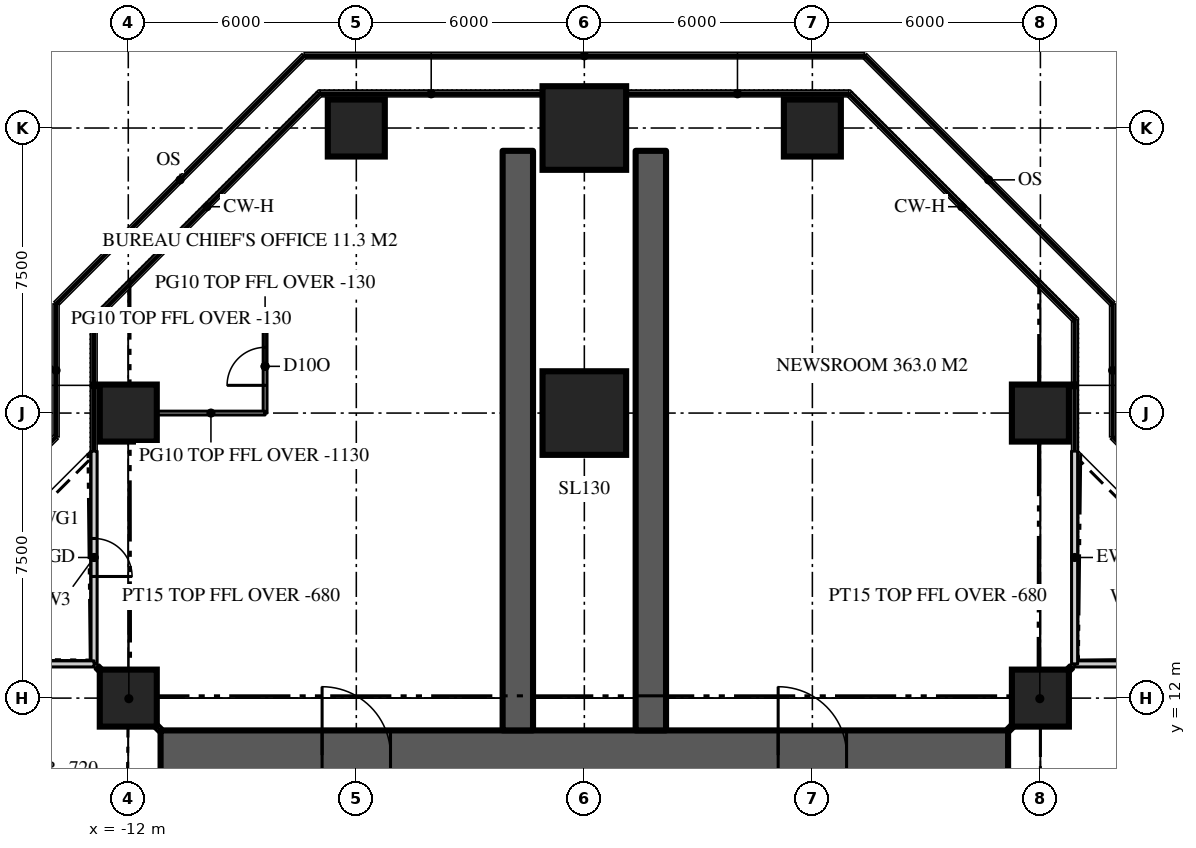
"""IFC4 building model, lengths in metres.
Left out: names, types, materials, properties, quantities, classifications, styles, units other than length and angle.
Written with IfcOpenShell. Run it as: python <this file> out.ifc"""

import sys

from ifc_helpers import new_model, si_unit, direction, frame, frame_2d, origin, origin_2d, place, context, subcontext, project, spatial, rectangle, extrude, element, fill, save


model = new_model("IFC4")
c1 = context("Model", 3, precision=1e-05, world=origin(), true_north=direction((0.0, 1.0)))
c2 = subcontext(c1, "Body", "Model", "MODEL_VIEW")
j1 = project(units=[si_unit("LENGTHUNIT", "METRE"), si_unit("PLANEANGLEUNIT", "RADIAN")], contexts=[c1])
p1 = place(None, origin())
s1 = spatial("IfcSite", under=j1, at=p1, CompositionType="ELEMENT")
p2 = place(p1, origin())
s2 = spatial("IfcBuilding", under=s1, at=p2, CompositionType="ELEMENT")
p3 = place(p2, frame((0.0, 0.0, 240.0)))
s3 = spatial("IfcBuildingStorey", under=s2, at=p3, CompositionType="ELEMENT", Elevation=240.0)
p4 = place(p3, frame((-11.15, 10.5, 0.0), z_axis=(0.0, 0.0, 1.0), x_axis=(1.0, 0.0, 0.0)))
e1 = element("IfcWall", 1, at=p4, inside=s3, PredefinedType="SHEAR", context=c2, shape_type="SweptSolid", body=[
    extrude(rectangle(XDim=22.3, YDim=1.3, at=frame_2d((11.15, 0.0))), origin(), (0.0, 0.0, 1.0), 3.9),
])
p5 = place(p4, frame((4.25, 0.0, 0.0)))
e2 = element("IfcOpeningElement", 2, at=p5, cuts=e1, PredefinedType="OPENING", context=c2, shape_type="SweptSolid", body=[
    extrude(rectangle(XDim=1.8, YDim=2.2, at=frame_2d((0.9, 1.1))), frame((0.0, 0.66, 0.0), z_axis=(0.0, -1.0, 0.0), x_axis=(1.0, 0.0, 0.0)), (0.0, 0.0, 1.0), 1.32),
])
p6 = place(p4, frame((16.25, 0.0, 0.0)))
e3 = element("IfcOpeningElement", 3, at=p6, cuts=e1, PredefinedType="OPENING", context=c2, shape_type="SweptSolid", body=[
    extrude(rectangle(XDim=1.8, YDim=2.2, at=frame_2d((0.9, 1.1))), frame((0.0, 0.66, 0.0), z_axis=(0.0, -1.0, 0.0), x_axis=(1.0, 0.0, 0.0)), (0.0, 0.0, 1.0), 1.32),
])
for number, where, z_axis, x_axis in (
    (4, (1.75, 11.15, 0.0), (0.0, 0.0, 1.0), (0.0, 1.0, 0.0)),
    (5, (-1.75, 11.15, 0.0), (0.0, 0.0, 1.0), (0.0, 1.0, 0.0)),
):
    element("IfcWall", number, at=place(p3, frame(where, z_axis=z_axis, x_axis=x_axis)), inside=s3, PredefinedType="SHEAR", context=c2, shape_type="SweptSolid", body=[
        extrude(rectangle(XDim=15.25, YDim=0.8, at=frame_2d((7.625, 0.0))), origin(), (0.0, 0.0, 1.0), 3.9),
    ])
for number, where, z_axis, x_axis in (
    (6, (-12.0, 12.0, 0.0), (0.0, 0.0, 1.0), (1.0, 0.0, 0.0)),
    (7, (12.0, 12.0, 0.0), (0.0, 0.0, 1.0), (1.0, 0.0, 0.0)),
    (8, (-12.0, 19.5, 0.0), (0.0, 0.0, 1.0), (1.0, 0.0, 0.0)),
):
    element("IfcColumn", number, at=place(p3, frame(where, z_axis=z_axis, x_axis=x_axis)), inside=s3, PredefinedType="COLUMN", context=c2, shape_type="SweptSolid", body=[
        extrude(rectangle(XDim=1.5, YDim=1.5, at=origin_2d()), origin(), (0.0, 0.0, 1.0), 3.9),
    ])
p7 = place(p3, frame((0.0, 19.5, 0.0), z_axis=(0.0, 0.0, 1.0), x_axis=(1.0, 0.0, 0.0)))
e9 = element("IfcColumn", 9, at=p7, inside=s3, PredefinedType="COLUMN", context=c2, shape_type="SweptSolid", body=[
    extrude(rectangle(XDim=2.2, YDim=2.2, at=origin_2d()), origin(), (0.0, 0.0, 1.0), 3.9),
])
for number, where, z_axis, x_axis in (
    (10, (12.0, 19.5, 0.0), (0.0, 0.0, 1.0), (1.0, 0.0, 0.0)),
    (11, (-6.0, 27.0, 0.0), (0.0, 0.0, 1.0), (1.0, 0.0, 0.0)),
):
    element("IfcColumn", number, at=place(p3, frame(where, z_axis=z_axis, x_axis=x_axis)), inside=s3, PredefinedType="COLUMN", context=c2, shape_type="SweptSolid", body=[
        extrude(rectangle(XDim=1.5, YDim=1.5, at=origin_2d()), origin(), (0.0, 0.0, 1.0), 3.9),
    ])
p8 = place(p3, frame((0.0, 27.0, 0.0), z_axis=(0.0, 0.0, 1.0), x_axis=(1.0, 0.0, 0.0)))
e12 = element("IfcColumn", 12, at=p8, inside=s3, PredefinedType="COLUMN", context=c2, shape_type="SweptSolid", body=[
    extrude(rectangle(XDim=2.2, YDim=2.2, at=origin_2d()), origin(), (0.0, 0.0, 1.0), 3.9),
])
p9 = place(p3, frame((6.0, 27.0, 0.0), z_axis=(0.0, 0.0, 1.0), x_axis=(1.0, 0.0, 0.0)))
e13 = element("IfcColumn", 13, at=p9, inside=s3, PredefinedType="COLUMN", context=c2, shape_type="SweptSolid", body=[
    extrude(rectangle(XDim=1.5, YDim=1.5, at=origin_2d()), origin(), (0.0, 0.0, 1.0), 3.9),
])
p10 = place(p3, frame((18.5, 12.9, 0.0), z_axis=(0.0, 0.0, 1.0), x_axis=(-1.0, 0.0, 0.0)))
e14 = element("IfcWall", 14, at=p10, inside=s3, PredefinedType="SOLIDWALL", context=c2, shape_type="SweptSolid", body=[
    extrude(rectangle(XDim=5.6, YDim=0.16, at=frame_2d((2.8, 0.0))), origin(), (0.0, 0.0, 1.0), 3.77),
])
p11 = place(p10, frame((2.3, 0.0, 0.0)))
e15 = element("IfcOpeningElement", 15, at=p11, cuts=e14, PredefinedType="OPENING", context=c2, shape_type="SweptSolid", body=[
    extrude(rectangle(XDim=1.0, YDim=2.2, at=frame_2d((0.5, 1.1))), frame((0.0, 0.09, 0.0), z_axis=(0.0, -1.0, 0.0), x_axis=(1.0, 0.0, 0.0)), (0.0, 0.0, 1.0), 0.18),
])
p12 = place(p3, frame((12.9, 12.9, 0.0), z_axis=(0.0, 0.0, 1.0), x_axis=(0.0, 1.0, 0.0)))
e16 = element("IfcWall", 16, at=p12, inside=s3, PredefinedType="SOLIDWALL", context=c2, shape_type="SweptSolid", body=[
    extrude(rectangle(XDim=5.6, YDim=0.16, at=frame_2d((2.8, 0.0))), origin(), (0.0, 0.0, 1.0), 3.77),
])
p13 = place(p3, frame((-12.9, 18.5, 0.0), z_axis=(0.0, 0.0, 1.0), x_axis=(0.0, -1.0, 0.0)))
e17 = element("IfcWall", 17, at=p13, inside=s3, PredefinedType="SOLIDWALL", context=c2, shape_type="SweptSolid", body=[
    extrude(rectangle(XDim=5.6, YDim=0.16, at=frame_2d((2.8, 0.0))), origin(), (0.0, 0.0, 1.0), 3.77),
])
p14 = place(p13, frame((2.3, 0.0, 0.0)))
e18 = element("IfcOpeningElement", 18, at=p14, cuts=e17, PredefinedType="OPENING", context=c2, shape_type="SweptSolid", body=[
    extrude(rectangle(XDim=1.0, YDim=2.2, at=frame_2d((0.5, 1.1))), frame((0.0, 0.09, 0.0), z_axis=(0.0, -1.0, 0.0), x_axis=(1.0, 0.0, 0.0)), (0.0, 0.0, 1.0), 0.18),
])
p15 = place(p3, frame((-12.9, 12.9, 0.0), z_axis=(0.0, 0.0, 1.0), x_axis=(-1.0, 0.0, 0.0)))
e19 = element("IfcWall", 19, at=p15, inside=s3, PredefinedType="SOLIDWALL", context=c2, shape_type="SweptSolid", body=[
    extrude(rectangle(XDim=5.6, YDim=0.16, at=frame_2d((2.8, 0.0))), origin(), (0.0, 0.0, 1.0), 3.77),
])
p16 = place(p3, frame((-8.4, 19.5, 0.0), z_axis=(0.0, 0.0, 1.0), x_axis=(0.0, 1.0, 0.0)))
e20 = element("IfcWall", 20, at=p16, inside=s3, PredefinedType="PARTITIONING", context=c2, shape_type="SweptSolid", body=[
    extrude(rectangle(XDim=2.459, YDim=0.1, at=frame_2d((1.229, 0.0))), origin(), (0.0, 0.0, 1.0), 3.77),
])
p17 = place(p16, frame((0.729, 0.0, 0.0)))
e21 = element("IfcOpeningElement", 21, at=p17, cuts=e20, PredefinedType="OPENING", context=c2, shape_type="SweptSolid", body=[
    extrude(rectangle(XDim=1.0, YDim=2.2, at=frame_2d((0.5, 1.1))), frame((0.0, 0.06, 0.0), z_axis=(0.0, -1.0, 0.0), x_axis=(1.0, 0.0, 0.0)), (0.0, 0.0, 1.0), 0.12),
])
p18 = place(p3, frame((-8.4, 19.5, 0.0), z_axis=(0.0, 0.0, 1.0), x_axis=(-1.0, 0.0, 0.0)))
e22 = element("IfcWall", 22, at=p18, inside=s3, PredefinedType="PARTITIONING", context=c2, shape_type="SweptSolid", body=[
    extrude(rectangle(XDim=2.85, YDim=0.1, at=frame_2d((1.425, 0.0))), origin(), (0.0, 0.0, 1.0), 2.77),
])
p19 = place(p3, frame((-8.4, 21.959, 0.0), z_axis=(0.0, 0.0, 1.0), x_axis=(-1.0, 0.0, 0.0)))
e23 = element("IfcWall", 23, at=p19, inside=s3, PredefinedType="PARTITIONING", context=c2, shape_type="SweptSolid", body=[
    extrude(rectangle(XDim=4.42, YDim=0.1, at=frame_2d((2.21, 0.0))), origin(), (0.0, 0.0, 1.0), 3.77),
])
for number, where, z_axis, x_axis in (
    (24, (11.15, 11.15, 0.0), (0.0, 0.0, 1.0), (0.707, 0.707, 0.0)),
    (25, (-11.15, 11.15, 0.0), (0.0, 0.0, 1.0), (-0.707, 0.707, 0.0)),
):
    element("IfcWall", number, at=place(p3, frame(where, z_axis=z_axis, x_axis=x_axis)), inside=s3, PredefinedType="PARTITIONING", context=c2, shape_type="SweptSolid", body=[
        extrude(rectangle(XDim=2.362, YDim=0.15, at=frame_2d((1.181, 0.0))), origin(), (0.0, 0.0, 1.0), 3.22),
    ])
p20 = place(p14, origin())
e26 = element("IfcDoor", 26, at=p20, inside=s3, OperationType="SINGLE_SWING_RIGHT", PredefinedType="DOOR", context=c2, shape_type="SweptSolid", body=[
    extrude(rectangle(XDim=1.0, YDim=2.2, at=frame_2d((0.5, 1.1))), frame((0.0, 0.025, 0.0), z_axis=(0.0, -1.0, 0.0), x_axis=(1.0, 0.0, 0.0)), (0.0, 0.0, 1.0), 0.05),
])
fill(e18, e26)
p21 = place(p5, origin())
e27 = element("IfcDoor", 27, at=p21, inside=s3, OperationType="DOUBLE_DOOR_DOUBLE_SWING", PredefinedType="DOOR", context=c2, shape_type="SweptSolid", body=[
    extrude(rectangle(XDim=1.8, YDim=2.2, at=frame_2d((0.9, 1.1))), frame((0.0, 0.025, 0.0), z_axis=(0.0, -1.0, 0.0), x_axis=(1.0, 0.0, 0.0)), (0.0, 0.0, 1.0), 0.05),
])
fill(e2, e27)
p22 = place(p6, origin())
e28 = element("IfcDoor", 28, at=p22, inside=s3, OperationType="DOUBLE_DOOR_DOUBLE_SWING", PredefinedType="DOOR", context=c2, shape_type="SweptSolid", body=[
    extrude(rectangle(XDim=1.8, YDim=2.2, at=frame_2d((0.9, 1.1))), frame((0.0, 0.025, 0.0), z_axis=(0.0, -1.0, 0.0), x_axis=(1.0, 0.0, 0.0)), (0.0, 0.0, 1.0), 0.05),
])
fill(e3, e28)
p23 = place(p17, origin())
e29 = element("IfcDoor", 29, at=p23, inside=s3, OperationType="SINGLE_SWING_LEFT", PredefinedType="DOOR", context=c2, shape_type="SweptSolid", body=[
    extrude(rectangle(XDim=1.0, YDim=2.2, at=frame_2d((0.5, 1.1))), frame((0.0, 0.025, 0.0), z_axis=(0.0, -1.0, 0.0), x_axis=(1.0, 0.0, 0.0)), (0.0, 0.0, 1.0), 0.05),
])
fill(e21, e29)
save(model, sys.argv[1])
